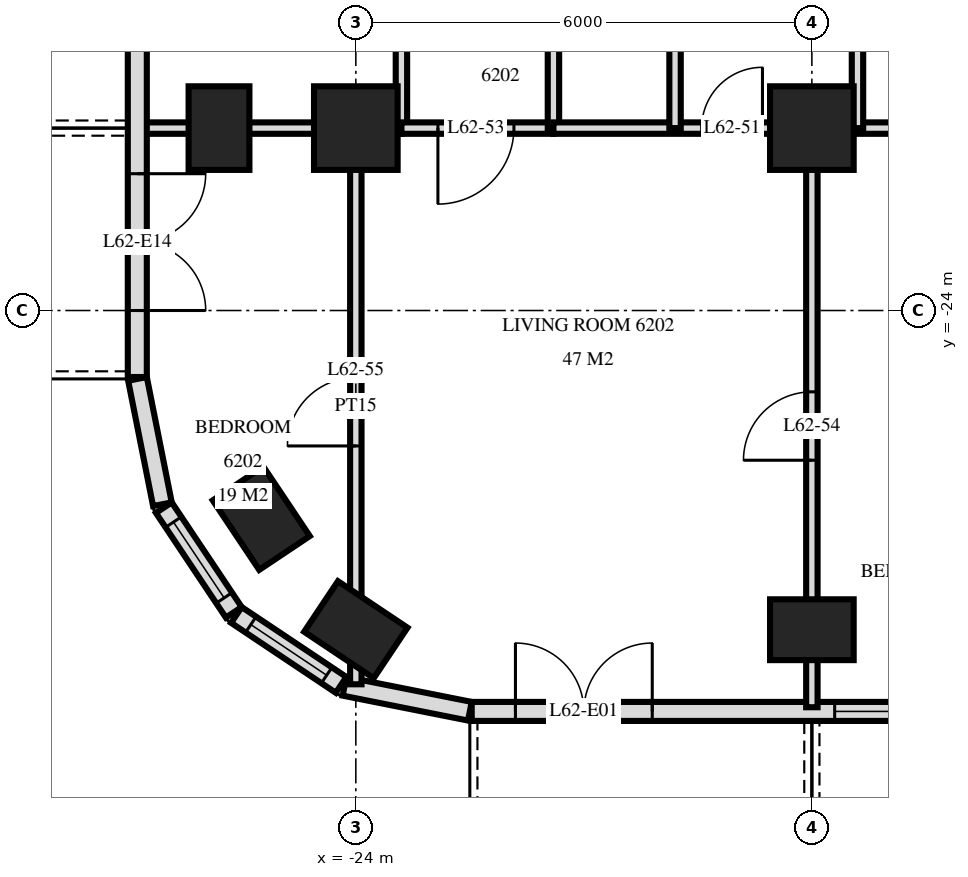
"""IFC4 building model, lengths in metres.
Left out: names, types, materials, properties, quantities, classifications, styles, units other than length and angle.
Written with IfcOpenShell. Run it as: python <this file> out.ifc"""

import sys

from ifc_helpers import new_model, si_unit, direction, frame, frame_2d, origin, origin_2d, place, context, subcontext, project, spatial, rectangle, extrude, element, fill, save


model = new_model("IFC4")
c1 = context("Model", 3, precision=1e-05, world=origin(), true_north=direction((0.0, 1.0)))
c2 = subcontext(c1, "Body", "Model", "MODEL_VIEW")
j1 = project(units=[si_unit("LENGTHUNIT", "METRE"), si_unit("PLANEANGLEUNIT", "RADIAN")], contexts=[c1])
p1 = place(None, origin())
s1 = spatial("IfcSite", under=j1, at=p1, CompositionType="ELEMENT")
p2 = place(p1, origin())
s2 = spatial("IfcBuilding", under=s1, at=p2, CompositionType="ELEMENT")
p3 = place(p2, frame((0.0, 0.0, 236.1)))
s3 = spatial("IfcBuildingStorey", under=s2, at=p3, CompositionType="ELEMENT", Elevation=236.1)
for number, where, z_axis, x_axis in (
    (1, (-25.8, -21.6, 0.0), (0.0, 0.0, 1.0), (0.0, 1.0, 0.0)),
    (2, (-25.244, -26.733, 0.0), (0.0, 0.0, 1.0), (-0.556, 0.831, 0.0)),
    (3, (-24.0, -28.2, 0.0), (0.0, 0.0, 1.0), (-0.831, 0.556, 0.0)),
):
    element("IfcColumn", number, at=place(p3, frame(where, z_axis=z_axis, x_axis=x_axis)), inside=s3, PredefinedType="COLUMN", context=c2, shape_type="SweptSolid", body=[
        extrude(rectangle(XDim=1.1, YDim=0.8, at=origin_2d()), origin(), (0.0, 0.0, 1.0), 3.5),
    ])
p4 = place(p3, frame((-24.0, -21.6, 0.0), z_axis=(0.0, 0.0, 1.0), x_axis=(1.0, 0.0, 0.0)))
e4 = element("IfcColumn", 4, at=p4, inside=s3, PredefinedType="COLUMN", context=c2, shape_type="SweptSolid", body=[
    extrude(rectangle(XDim=1.1, YDim=1.1, at=origin_2d()), origin(), (0.0, 0.0, 1.0), 3.5),
])
p5 = place(p3, frame((-18.0, -28.2, 0.0), z_axis=(0.0, 0.0, 1.0), x_axis=(1.0, 0.0, 0.0)))
e5 = element("IfcColumn", 5, at=p5, inside=s3, PredefinedType="COLUMN", context=c2, shape_type="SweptSolid", body=[
    extrude(rectangle(XDim=1.1, YDim=0.8, at=origin_2d()), origin(), (0.0, 0.0, 1.0), 3.5),
])
p6 = place(p3, frame((-18.0, -21.6, 0.0), z_axis=(0.0, 0.0, 1.0), x_axis=(1.0, 0.0, 0.0)))
e6 = element("IfcColumn", 6, at=p6, inside=s3, PredefinedType="COLUMN", context=c2, shape_type="SweptSolid", body=[
    extrude(rectangle(XDim=1.1, YDim=1.1, at=origin_2d()), origin(), (0.0, 0.0, 1.0), 3.5),
])
p7 = place(p3, frame((-26.875, -3.325, 0.0), z_axis=(0.0, 0.0, 1.0), x_axis=(0.0, -1.0, 0.0)))
e7 = element("IfcWall", 7, at=p7, inside=s3, PredefinedType="SOLIDWALL", context=c2, shape_type="SweptSolid", body=[
    extrude(rectangle(XDim=21.551, YDim=0.25, at=frame_2d((10.775, 0.0))), origin(), (0.0, 0.0, 1.0), 3.22),
])
p8 = place(p7, frame((7.525, 0.0, 0.0)))
e8 = element("IfcOpeningElement", 8, at=p8, cuts=e7, PredefinedType="OPENING", context=c2, shape_type="SweptSolid", body=[
    extrude(rectangle(XDim=1.8, YDim=2.4, at=frame_2d((0.9, 1.2))), frame((0.0, 0.135, 0.0), z_axis=(0.0, -1.0, 0.0), x_axis=(1.0, 0.0, 0.0)), (0.0, 0.0, 1.0), 0.27),
])
p9 = place(p7, frame((12.275, 0.0, 0.9)))
e9 = element("IfcOpeningElement", 9, at=p9, cuts=e7, PredefinedType="OPENING", context=c2, shape_type="SweptSolid", body=[
    extrude(rectangle(XDim=1.2, YDim=1.5, at=frame_2d((0.6, 0.75))), frame((0.0, 0.135, 0.0), z_axis=(0.0, -1.0, 0.0), x_axis=(1.0, 0.0, 0.0)), (0.0, 0.0, 1.0), 0.27),
])
p10 = place(p7, frame((15.275, 0.0, 0.0)))
e10 = element("IfcOpeningElement", 10, at=p10, cuts=e7, PredefinedType="OPENING", context=c2, shape_type="SweptSolid", body=[
    extrude(rectangle(XDim=1.8, YDim=2.4, at=frame_2d((0.9, 1.2))), frame((0.0, 0.135, 0.0), z_axis=(0.0, -1.0, 0.0), x_axis=(1.0, 0.0, 0.0)), (0.0, 0.0, 1.0), 0.27),
])
p11 = place(p7, frame((18.875, 0.0, 0.0)))
e11 = element("IfcOpeningElement", 11, at=p11, cuts=e7, PredefinedType="OPENING", context=c2, shape_type="SweptSolid", body=[
    extrude(rectangle(XDim=1.8, YDim=2.4, at=frame_2d((0.9, 1.2))), frame((0.0, 0.135, 0.0), z_axis=(0.0, -1.0, 0.0), x_axis=(1.0, 0.0, 0.0)), (0.0, 0.0, 1.0), 0.27),
])
p12 = place(p3, frame((-26.873, -24.9, 0.0), z_axis=(0.0, 0.0, 1.0), x_axis=(0.195026884138, -0.980797896849, 0.0)))
e12 = element("IfcWall", 12, at=p12, inside=s3, PredefinedType="SOLIDWALL", context=c2, shape_type="SweptSolid", body=[
    extrude(rectangle(XDim=1.681, YDim=0.25, at=frame_2d((0.841, 0.0))), origin(), (0.0, 0.0, 1.0), 3.22),
])
p13 = place(p3, frame((-26.526, -26.594, 0.0), z_axis=(0.0, 0.0, 1.0), x_axis=(0.55555029066, -0.831482937015, 0.0)))
e13 = element("IfcWall", 13, at=p13, inside=s3, PredefinedType="SOLIDWALL", context=c2, shape_type="SweptSolid", body=[
    extrude(rectangle(XDim=1.656, YDim=0.25, at=frame_2d((0.828, 0.0))), origin(), (0.0, 0.0, 1.0), 3.22),
])
p14 = place(p13, frame((0.228, 0.0, 0.9)))
e14 = element("IfcOpeningElement", 14, at=p14, cuts=e13, PredefinedType="OPENING", context=c2, shape_type="SweptSolid", body=[
    extrude(rectangle(XDim=1.2, YDim=1.5, at=frame_2d((0.6, 0.75))), frame((0.0, 0.135, 0.0), z_axis=(0.0, -1.0, 0.0), x_axis=(1.0, 0.0, 0.0)), (0.0, 0.0, 1.0), 0.27),
])
p15 = place(p3, frame((-25.571, -28.006, 0.0), z_axis=(0.0, 0.0, 1.0), x_axis=(0.831482937015, -0.55555029066, 0.0)))
e15 = element("IfcWall", 15, at=p15, inside=s3, PredefinedType="SOLIDWALL", context=c2, shape_type="SweptSolid", body=[
    extrude(rectangle(XDim=1.656, YDim=0.25, at=frame_2d((0.828, 0.0))), origin(), (0.0, 0.0, 1.0), 3.22),
])
p16 = place(p15, frame((0.228, 0.0, 0.9)))
e16 = element("IfcOpeningElement", 16, at=p16, cuts=e15, PredefinedType="OPENING", context=c2, shape_type="SweptSolid", body=[
    extrude(rectangle(XDim=1.2, YDim=1.5, at=frame_2d((0.6, 0.75))), frame((0.0, 0.135, 0.0), z_axis=(0.0, -1.0, 0.0), x_axis=(1.0, 0.0, 0.0)), (0.0, 0.0, 1.0), 0.27),
])
p17 = place(p3, frame((-24.149, -28.945, 0.0), z_axis=(0.0, 0.0, 1.0), x_axis=(0.980775640221, -0.19513878023, 0.0)))
e17 = element("IfcWall", 17, at=p17, inside=s3, PredefinedType="SOLIDWALL", context=c2, shape_type="SweptSolid", body=[
    extrude(rectangle(XDim=1.681, YDim=0.25, at=frame_2d((0.841, 0.0))), origin(), (0.0, 0.0, 1.0), 3.22),
])
p18 = place(p3, frame((-22.475, -29.275, 0.0), z_axis=(0.0, 0.0, 1.0), x_axis=(1.0, 0.0, 0.0)))
e18 = element("IfcWall", 18, at=p18, inside=s3, PredefinedType="SOLIDWALL", context=c2, shape_type="SweptSolid", body=[
    extrude(rectangle(XDim=44.951, YDim=0.25, at=frame_2d((22.475, 0.0))), origin(), (0.0, 0.0, 1.0), 3.22),
])
p19 = place(p18, frame((0.575, 0.0, 0.0)))
e19 = element("IfcOpeningElement", 19, at=p19, cuts=e18, PredefinedType="OPENING", context=c2, shape_type="SweptSolid", body=[
    extrude(rectangle(XDim=1.8, YDim=2.4, at=frame_2d((0.9, 1.2))), frame((0.0, 0.135, 0.0), z_axis=(0.0, -1.0, 0.0), x_axis=(1.0, 0.0, 0.0)), (0.0, 0.0, 1.0), 0.27),
])
p20 = place(p18, frame((4.775, 0.0, 0.9)))
e20 = element("IfcOpeningElement", 20, at=p20, cuts=e18, PredefinedType="OPENING", context=c2, shape_type="SweptSolid", body=[
    extrude(rectangle(XDim=2.4, YDim=1.5, at=frame_2d((1.2, 0.75))), frame((0.0, 0.135, 0.0), z_axis=(0.0, -1.0, 0.0), x_axis=(1.0, 0.0, 0.0)), (0.0, 0.0, 1.0), 0.27),
])
p21 = place(p18, frame((8.075, 0.0, 0.0)))
e21 = element("IfcOpeningElement", 21, at=p21, cuts=e18, PredefinedType="OPENING", context=c2, shape_type="SweptSolid", body=[
    extrude(rectangle(XDim=1.8, YDim=2.4, at=frame_2d((0.9, 1.2))), frame((0.0, 0.135, 0.0), z_axis=(0.0, -1.0, 0.0), x_axis=(1.0, 0.0, 0.0)), (0.0, 0.0, 1.0), 0.27),
])
p22 = place(p18, frame((11.075, 0.0, 0.0)))
e22 = element("IfcOpeningElement", 22, at=p22, cuts=e18, PredefinedType="OPENING", context=c2, shape_type="SweptSolid", body=[
    extrude(rectangle(XDim=1.8, YDim=2.4, at=frame_2d((0.9, 1.2))), frame((0.0, 0.135, 0.0), z_axis=(0.0, -1.0, 0.0), x_axis=(1.0, 0.0, 0.0)), (0.0, 0.0, 1.0), 0.27),
])
p23 = place(p18, frame((13.775, 0.0, 0.9)))
e23 = element("IfcOpeningElement", 23, at=p23, cuts=e18, PredefinedType="OPENING", context=c2, shape_type="SweptSolid", body=[
    extrude(rectangle(XDim=2.4, YDim=1.5, at=frame_2d((1.2, 0.75))), frame((0.0, 0.135, 0.0), z_axis=(0.0, -1.0, 0.0), x_axis=(1.0, 0.0, 0.0)), (0.0, 0.0, 1.0), 0.27),
])
p24 = place(p18, frame((16.775, 0.0, 0.9)))
e24 = element("IfcOpeningElement", 24, at=p24, cuts=e18, PredefinedType="OPENING", context=c2, shape_type="SweptSolid", body=[
    extrude(rectangle(XDim=2.4, YDim=1.5, at=frame_2d((1.2, 0.75))), frame((0.0, 0.135, 0.0), z_axis=(0.0, -1.0, 0.0), x_axis=(1.0, 0.0, 0.0)), (0.0, 0.0, 1.0), 0.27),
])
p25 = place(p18, frame((20.075, 0.0, 0.0)))
e25 = element("IfcOpeningElement", 25, at=p25, cuts=e18, PredefinedType="OPENING", context=c2, shape_type="SweptSolid", body=[
    extrude(rectangle(XDim=1.8, YDim=2.4, at=frame_2d((0.9, 1.2))), frame((0.0, 0.135, 0.0), z_axis=(0.0, -1.0, 0.0), x_axis=(1.0, 0.0, 0.0)), (0.0, 0.0, 1.0), 0.27),
])
p26 = place(p18, frame((23.075, 0.0, 0.0)))
e26 = element("IfcOpeningElement", 26, at=p26, cuts=e18, PredefinedType="OPENING", context=c2, shape_type="SweptSolid", body=[
    extrude(rectangle(XDim=1.8, YDim=2.4, at=frame_2d((0.9, 1.2))), frame((0.0, 0.135, 0.0), z_axis=(0.0, -1.0, 0.0), x_axis=(1.0, 0.0, 0.0)), (0.0, 0.0, 1.0), 0.27),
])
p27 = place(p18, frame((25.775, 0.0, 0.9)))
e27 = element("IfcOpeningElement", 27, at=p27, cuts=e18, PredefinedType="OPENING", context=c2, shape_type="SweptSolid", body=[
    extrude(rectangle(XDim=2.4, YDim=1.5, at=frame_2d((1.2, 0.75))), frame((0.0, 0.135, 0.0), z_axis=(0.0, -1.0, 0.0), x_axis=(1.0, 0.0, 0.0)), (0.0, 0.0, 1.0), 0.27),
])
p28 = place(p18, frame((29.075, 0.0, 0.0)))
e28 = element("IfcOpeningElement", 28, at=p28, cuts=e18, PredefinedType="OPENING", context=c2, shape_type="SweptSolid", body=[
    extrude(rectangle(XDim=1.8, YDim=2.4, at=frame_2d((0.9, 1.2))), frame((0.0, 0.135, 0.0), z_axis=(0.0, -1.0, 0.0), x_axis=(1.0, 0.0, 0.0)), (0.0, 0.0, 1.0), 0.27),
])
p29 = place(p18, frame((31.775, 0.0, 0.9)))
e29 = element("IfcOpeningElement", 29, at=p29, cuts=e18, PredefinedType="OPENING", context=c2, shape_type="SweptSolid", body=[
    extrude(rectangle(XDim=2.4, YDim=1.5, at=frame_2d((1.2, 0.75))), frame((0.0, 0.135, 0.0), z_axis=(0.0, -1.0, 0.0), x_axis=(1.0, 0.0, 0.0)), (0.0, 0.0, 1.0), 0.27),
])
p30 = place(p18, frame((35.075, 0.0, 0.0)))
e30 = element("IfcOpeningElement", 30, at=p30, cuts=e18, PredefinedType="OPENING", context=c2, shape_type="SweptSolid", body=[
    extrude(rectangle(XDim=1.8, YDim=2.4, at=frame_2d((0.9, 1.2))), frame((0.0, 0.135, 0.0), z_axis=(0.0, -1.0, 0.0), x_axis=(1.0, 0.0, 0.0)), (0.0, 0.0, 1.0), 0.27),
])
p31 = place(p18, frame((41.075, 0.0, 0.0)))
e31 = element("IfcOpeningElement", 31, at=p31, cuts=e18, PredefinedType="OPENING", context=c2, shape_type="SweptSolid", body=[
    extrude(rectangle(XDim=1.8, YDim=2.4, at=frame_2d((0.9, 1.2))), frame((0.0, 0.135, 0.0), z_axis=(0.0, -1.0, 0.0), x_axis=(1.0, 0.0, 0.0)), (0.0, 0.0, 1.0), 0.27),
])
p32 = place(p3, frame((-17.4, -21.6, 0.0), z_axis=(0.0, 0.0, 1.0), x_axis=(0.0, 1.0, 0.0)))
e32 = element("IfcWall", 32, at=p32, inside=s3, PredefinedType="PARTITIONING", context=c2, shape_type="SweptSolid", body=[
    extrude(rectangle(XDim=4.2, YDim=0.15, at=frame_2d((2.1, 0.0))), origin(), (0.0, 0.0, 1.0), 3.22),
])
p33 = place(p3, frame((-18.0, -29.22, 0.0), z_axis=(0.0, 0.0, 1.0), x_axis=(0.0, 1.0, 0.0)))
e33 = element("IfcWall", 33, at=p33, inside=s3, PredefinedType="PARTITIONING", context=c2, shape_type="SweptSolid", body=[
    extrude(rectangle(XDim=7.62, YDim=0.15, at=frame_2d((3.81, 0.0))), origin(), (0.0, 0.0, 1.0), 3.22),
])
p34 = place(p33, frame((3.25, 0.0, 0.0)))
e34 = element("IfcOpeningElement", 34, at=p34, cuts=e33, PredefinedType="OPENING", context=c2, shape_type="SweptSolid", body=[
    extrude(rectangle(XDim=0.9, YDim=2.1, at=frame_2d((0.45, 1.05))), frame((0.0, 0.085, 0.0), z_axis=(0.0, -1.0, 0.0), x_axis=(1.0, 0.0, 0.0)), (0.0, 0.0, 1.0), 0.17),
])
for number, where, z_axis, x_axis in (
    (35, (-19.8, -21.6, 0.0), (0.0, 0.0, 1.0), (0.0, 1.0, 0.0)),
    (36, (-21.4, -21.6, 0.0), (0.0, 0.0, 1.0), (0.0, 1.0, 0.0)),
):
    element("IfcWall", number, at=place(p3, frame(where, z_axis=z_axis, x_axis=x_axis)), inside=s3, PredefinedType="PARTITIONING", context=c2, shape_type="SweptSolid", body=[
        extrude(rectangle(XDim=4.2, YDim=0.15, at=frame_2d((2.1, 0.0))), origin(), (0.0, 0.0, 1.0), 3.22),
    ])
p35 = place(p3, frame((-23.4, -21.6, 0.0), z_axis=(0.0, 0.0, 1.0), x_axis=(0.0, 1.0, 0.0)))
e37 = element("IfcWall", 37, at=p35, inside=s3, PredefinedType="PARTITIONING", context=c2, shape_type="SweptSolid", body=[
    extrude(rectangle(XDim=4.2, YDim=0.15, at=frame_2d((2.1, 0.0))), origin(), (0.0, 0.0, 1.0), 3.22),
])
p36 = place(p35, frame((1.58, 0.0, 0.0)))
e38 = element("IfcOpeningElement", 38, at=p36, cuts=e37, PredefinedType="OPENING", context=c2, shape_type="SweptSolid", body=[
    extrude(rectangle(XDim=1.0, YDim=2.1, at=frame_2d((0.5, 1.05))), frame((0.0, 0.085, 0.0), z_axis=(0.0, -1.0, 0.0), x_axis=(1.0, 0.0, 0.0)), (0.0, 0.0, 1.0), 0.17),
])
p37 = place(p3, frame((-24.0, -28.918, 0.0), z_axis=(0.0, 0.0, 1.0), x_axis=(0.0, 1.0, 0.0)))
e39 = element("IfcWall", 39, at=p37, inside=s3, PredefinedType="PARTITIONING", context=c2, shape_type="SweptSolid", body=[
    extrude(rectangle(XDim=7.318, YDim=0.15, at=frame_2d((3.659, 0.0))), origin(), (0.0, 0.0, 1.0), 3.22),
])
p38 = place(p37, frame((3.136, 0.0, 0.0)))
e40 = element("IfcOpeningElement", 40, at=p38, cuts=e39, PredefinedType="OPENING", context=c2, shape_type="SweptSolid", body=[
    extrude(rectangle(XDim=0.9, YDim=2.1, at=frame_2d((0.45, 1.05))), frame((0.0, 0.085, 0.0), z_axis=(0.0, -1.0, 0.0), x_axis=(1.0, 0.0, 0.0)), (0.0, 0.0, 1.0), 0.17),
])
p39 = place(p3, frame((-23.4, -21.6, 0.0), z_axis=(0.0, 0.0, 1.0), x_axis=(1.0, 0.0, 0.0)))
e41 = element("IfcWall", 41, at=p39, inside=s3, PredefinedType="PARTITIONING", context=c2, shape_type="SweptSolid", body=[
    extrude(rectangle(XDim=2.0, YDim=0.15, at=frame_2d((1.0, 0.0))), origin(), (0.0, 0.0, 1.0), 3.22),
])
p40 = place(p39, frame((0.48, 0.0, 0.0)))
e42 = element("IfcOpeningElement", 42, at=p40, cuts=e41, PredefinedType="OPENING", context=c2, shape_type="SweptSolid", body=[
    extrude(rectangle(XDim=1.0, YDim=2.1, at=frame_2d((0.5, 1.05))), frame((0.0, 0.085, 0.0), z_axis=(0.0, -1.0, 0.0), x_axis=(1.0, 0.0, 0.0)), (0.0, 0.0, 1.0), 0.17),
])
p41 = place(p3, frame((-26.82, -21.6, 0.0), z_axis=(0.0, 0.0, 1.0), x_axis=(1.0, 0.0, 0.0)))
e43 = element("IfcWall", 43, at=p41, inside=s3, PredefinedType="PARTITIONING", context=c2, shape_type="SweptSolid", body=[
    extrude(rectangle(XDim=3.42, YDim=0.15, at=frame_2d((1.71, 0.0))), origin(), (0.0, 0.0, 1.0), 3.22),
])
p42 = place(p3, frame((-21.4, -21.6, 0.0), z_axis=(0.0, 0.0, 1.0), x_axis=(1.0, 0.0, 0.0)))
e44 = element("IfcWall", 44, at=p42, inside=s3, PredefinedType="PARTITIONING", context=c2, shape_type="SweptSolid", body=[
    extrude(rectangle(XDim=6.4, YDim=0.15, at=frame_2d((3.2, 0.0))), origin(), (0.0, 0.0, 1.0), 3.22),
])
p43 = place(p42, frame((4.78, 0.0, 0.0)))
e45 = element("IfcOpeningElement", 45, at=p43, cuts=e44, PredefinedType="OPENING", context=c2, shape_type="SweptSolid", body=[
    extrude(rectangle(XDim=0.8, YDim=2.1, at=frame_2d((0.4, 1.05))), frame((0.0, 0.085, 0.0), z_axis=(0.0, -1.0, 0.0), x_axis=(1.0, 0.0, 0.0)), (0.0, 0.0, 1.0), 0.17),
])
p44 = place(p42, frame((1.95, 0.0, 0.0)))
e46 = element("IfcOpeningElement", 46, at=p44, cuts=e44, PredefinedType="OPENING", context=c2, shape_type="SweptSolid", body=[
    extrude(rectangle(XDim=0.8, YDim=2.1, at=frame_2d((0.4, 1.05))), frame((0.0, 0.085, 0.0), z_axis=(0.0, -1.0, 0.0), x_axis=(1.0, 0.0, 0.0)), (0.0, 0.0, 1.0), 0.17),
])
p45 = place(p14, origin())
e47 = element("IfcWindow", 47, at=p45, inside=s3, PartitioningType="SINGLE_PANEL", PredefinedType="WINDOW", context=c2, shape_type="SweptSolid", body=[
    extrude(rectangle(XDim=1.2, YDim=1.5, at=frame_2d((0.6, 0.75))), frame((0.0, 0.03, 0.0), z_axis=(0.0, -1.0, 0.0), x_axis=(1.0, 0.0, 0.0)), (0.0, 0.0, 1.0), 0.06),
])
fill(e14, e47)
p46 = place(p16, origin())
e48 = element("IfcWindow", 48, at=p46, inside=s3, PartitioningType="SINGLE_PANEL", PredefinedType="WINDOW", context=c2, shape_type="SweptSolid", body=[
    extrude(rectangle(XDim=1.2, YDim=1.5, at=frame_2d((0.6, 0.75))), frame((0.0, 0.03, 0.0), z_axis=(0.0, -1.0, 0.0), x_axis=(1.0, 0.0, 0.0)), (0.0, 0.0, 1.0), 0.06),
])
fill(e16, e48)
p47 = place(p19, origin())
e49 = element("IfcDoor", 49, at=p47, inside=s3, OperationType="DOUBLE_DOOR_SINGLE_SWING", PredefinedType="DOOR", context=c2, shape_type="SweptSolid", body=[
    extrude(rectangle(XDim=1.8, YDim=2.4, at=frame_2d((0.9, 1.2))), frame((0.0, 0.025, 0.0), z_axis=(0.0, -1.0, 0.0), x_axis=(1.0, 0.0, 0.0)), (0.0, 0.0, 1.0), 0.05),
])
fill(e19, e49)
p48 = place(p20, origin())
e50 = element("IfcWindow", 50, at=p48, inside=s3, PartitioningType="SINGLE_PANEL", PredefinedType="WINDOW", context=c2, shape_type="SweptSolid", body=[
    extrude(rectangle(XDim=2.4, YDim=1.5, at=frame_2d((1.2, 0.75))), frame((0.0, 0.03, 0.0), z_axis=(0.0, -1.0, 0.0), x_axis=(1.0, 0.0, 0.0)), (0.0, 0.0, 1.0), 0.06),
])
fill(e20, e50)
p49 = place(p11, origin())
e51 = element("IfcDoor", 51, at=p49, inside=s3, OperationType="DOUBLE_DOOR_SINGLE_SWING", PredefinedType="DOOR", context=c2, shape_type="SweptSolid", body=[
    extrude(rectangle(XDim=1.8, YDim=2.4, at=frame_2d((0.9, 1.2))), frame((0.0, 0.025, 0.0), z_axis=(0.0, -1.0, 0.0), x_axis=(1.0, 0.0, 0.0)), (0.0, 0.0, 1.0), 0.05),
])
fill(e11, e51)
p50 = place(p44, origin())
e52 = element("IfcDoor", 52, at=p50, inside=s3, OperationType="SINGLE_SWING_LEFT", PredefinedType="DOOR", context=c2, shape_type="SweptSolid", body=[
    extrude(rectangle(XDim=0.8, YDim=2.1, at=frame_2d((0.4, 1.05))), frame((0.0, 0.025, 0.0), z_axis=(0.0, -1.0, 0.0), x_axis=(1.0, 0.0, 0.0)), (0.0, 0.0, 1.0), 0.05),
])
fill(e46, e52)
p51 = place(p40, frame((0.5, 0.0, 0.0), z_axis=(0.0, 0.0, 1.0), x_axis=(-1.0, 0.0, 0.0)))
e53 = element("IfcDoor", 53, at=p51, inside=s3, OperationType="SINGLE_SWING_LEFT", PredefinedType="DOOR", context=c2, shape_type="SweptSolid", body=[
    extrude(rectangle(XDim=1.0, YDim=2.1, at=frame_2d((0.0, 1.05))), frame((0.0, -0.025, 0.0), z_axis=(0.0, 1.0, 0.0), x_axis=(-1.0, 0.0, 0.0)), (0.0, 0.0, 1.0), 0.05),
])
fill(e42, e53)
p52 = place(p34, origin())
e54 = element("IfcDoor", 54, at=p52, inside=s3, OperationType="SINGLE_SWING_RIGHT", PredefinedType="DOOR", context=c2, shape_type="SweptSolid", body=[
    extrude(rectangle(XDim=0.9, YDim=2.1, at=frame_2d((0.45, 1.05))), frame((0.0, 0.025, 0.0), z_axis=(0.0, -1.0, 0.0), x_axis=(1.0, 0.0, 0.0)), (0.0, 0.0, 1.0), 0.05),
])
fill(e34, e54)
p53 = place(p38, origin())
e55 = element("IfcDoor", 55, at=p53, inside=s3, OperationType="SINGLE_SWING_RIGHT", PredefinedType="DOOR", context=c2, shape_type="SweptSolid", body=[
    extrude(rectangle(XDim=0.9, YDim=2.1, at=frame_2d((0.45, 1.05))), frame((0.0, 0.025, 0.0), z_axis=(0.0, -1.0, 0.0), x_axis=(1.0, 0.0, 0.0)), (0.0, 0.0, 1.0), 0.05),
])
fill(e40, e55)
save(model, sys.argv[1])
